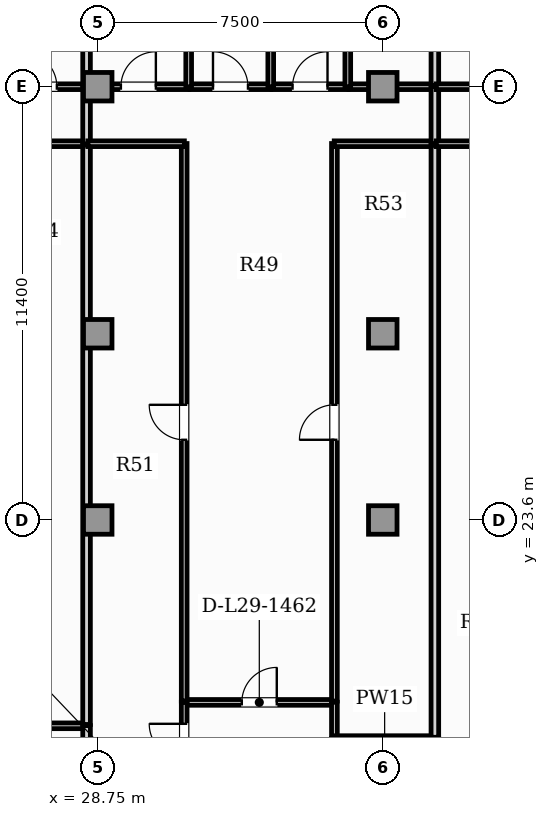
"""IFC4 building model, lengths in metres.
Left out: names, types, materials, properties, quantities, classifications, styles, units other than length and angle.
Written with IfcOpenShell. Run it as: python <this file> out.ifc"""

import sys

from ifc_helpers import new_model, si_unit, direction, frame, frame_2d, origin, origin_2d, place, context, subcontext, project, spatial, rectangle, extrude, element, fill, save


model = new_model("IFC4")
c1 = context("Model", 3, precision=1e-05, world=origin(), true_north=direction((0.0, 1.0)))
c2 = subcontext(c1, "Body", "Model", "MODEL_VIEW")
j1 = project(units=[si_unit("LENGTHUNIT", "METRE"), si_unit("PLANEANGLEUNIT", "RADIAN")], contexts=[c1])
p1 = place(None, origin())
s1 = spatial("IfcSite", under=j1, at=p1, CompositionType="ELEMENT")
p2 = place(p1, origin())
s2 = spatial("IfcBuilding", under=s1, at=p2, CompositionType="ELEMENT")
p3 = place(p2, frame((0.0, 0.0, 119.55)))
s3 = spatial("IfcBuildingStorey", under=s2, at=p3, CompositionType="ELEMENT", Elevation=119.55)
for number, where, z_axis, x_axis in (
    (1, (28.75, 23.6, 0.0), (0.0, 0.0, 1.0), (1.0, 0.0, 0.0)),
    (2, (36.25, 23.6, 0.0), (0.0, 0.0, 1.0), (1.0, 0.0, 0.0)),
    (3, (28.75, 28.5, 0.0), (0.0, 0.0, 1.0), (1.0, 0.0, 0.0)),
    (4, (36.25, 28.5, 0.0), (0.0, 0.0, 1.0), (1.0, 0.0, 0.0)),
    (5, (28.75, 35.0, 0.0), (0.0, 0.0, 1.0), (1.0, 0.0, 0.0)),
    (6, (36.25, 35.0, 0.0), (0.0, 0.0, 1.0), (1.0, 0.0, 0.0)),
):
    element("IfcColumn", number, at=place(p3, frame(where, z_axis=z_axis, x_axis=x_axis)), inside=s3, PredefinedType="COLUMN", context=c2, shape_type="SweptSolid", body=[
        extrude(rectangle(XDim=0.75, YDim=0.75, at=origin_2d()), origin(), (0.0, 0.0, 1.0), 3.85),
    ])
p4 = place(p3, frame((26.004, 33.5, 0.0), z_axis=(0.0, 0.0, 1.0), x_axis=(1.0, 0.0, 0.0)))
e7 = element("IfcWall", 7, at=p4, inside=s3, PredefinedType="PARTITIONING", context=c2, shape_type="SweptSolid", body=[
    extrude(rectangle(XDim=2.457, YDim=0.15, at=frame_2d((1.229, 0.0))), origin(), (0.0, 0.0, 1.0), 3.6),
])
p5 = place(p3, frame((25.967, 35.0, 0.0), z_axis=(0.0, 0.0, 1.0), x_axis=(1.0, 0.0, 0.0)))
e8 = element("IfcWall", 8, at=p5, inside=s3, PredefinedType="PARTITIONING", context=c2, shape_type="SweptSolid", body=[
    extrude(rectangle(XDim=2.494, YDim=0.15, at=frame_2d((1.247, 0.0))), origin(), (0.0, 0.0, 1.0), 2.983),
])
p6 = place(p5, frame((0.787, 0.0, 0.0)))
e9 = element("IfcOpeningElement", 9, at=p6, cuts=e8, PredefinedType="OPENING", context=c2, shape_type="SweptSolid", body=[
    extrude(rectangle(XDim=0.92, YDim=2.1, at=frame_2d((0.46, 1.05))), frame((0.0, 0.085, 0.0), z_axis=(0.0, -1.0, 0.0), x_axis=(1.0, 0.0, 0.0)), (0.0, 0.0, 1.0), 0.17),
])
p7 = place(p3, frame((28.456, 33.495, 0.0), z_axis=(0.0, 0.0, 1.0), x_axis=(0.0, 1.0, 0.0)))
e10 = element("IfcWall", 10, at=p7, inside=s3, PredefinedType="PARTITIONING", context=c2, shape_type="SweptSolid", body=[
    extrude(rectangle(XDim=1.51, YDim=0.2, at=frame_2d((0.755, 0.0))), origin(), (0.0, 0.0, 1.0), 3.6),
])
p8 = place(p3, frame((26.004, 18.185, 0.0), z_axis=(0.0, 0.0, 1.0), x_axis=(1.0, 0.0, 0.0)))
e11 = element("IfcWall", 11, at=p8, inside=s3, PredefinedType="PARTITIONING", context=c2, shape_type="SweptSolid", body=[
    extrude(rectangle(XDim=2.457, YDim=0.15, at=frame_2d((1.229, 0.0))), origin(), (0.0, 0.0, 1.0), 3.6),
])
p9 = place(p3, frame((28.456, 16.748, 0.0), z_axis=(0.0, 0.0, 1.0), x_axis=(0.0, 1.0, 0.0)))
e12 = element("IfcWall", 12, at=p9, inside=s3, PredefinedType="PARTITIONING", context=c2, shape_type="SweptSolid", body=[
    extrude(rectangle(XDim=1.441, YDim=0.2, at=frame_2d((0.721, 0.0))), origin(), (0.0, 0.0, 1.0), 3.6),
])
p10 = place(p3, frame((28.456, 18.219, 0.0), z_axis=(0.0, 0.0, 1.0), x_axis=(0.0, 1.0, 0.0)))
e13 = element("IfcWall", 13, at=p10, inside=s3, PredefinedType="PARTITIONING", context=c2, shape_type="SweptSolid", body=[
    extrude(rectangle(XDim=15.246, YDim=0.2, at=frame_2d((7.623, 0.0))), origin(), (0.0, 0.0, 1.0), 3.6),
])
p11 = place(p3, frame((28.456, 35.035, 0.0), z_axis=(0.0, 0.0, 1.0), x_axis=(0.0, 1.0, 0.0)))
e14 = element("IfcWall", 14, at=p11, inside=s3, PredefinedType="PARTITIONING", context=c2, shape_type="SweptSolid", body=[
    extrude(rectangle(XDim=7.955, YDim=0.2, at=frame_2d((3.978, 0.0))), origin(), (0.0, 0.0, 1.0), 3.6),
])
p12 = place(p3, frame((31.02, 18.801, 0.0), z_axis=(0.0, 0.0, 1.0), x_axis=(1.0, 0.0, 0.0)))
e15 = element("IfcWall", 15, at=p12, inside=s3, PredefinedType="PARTITIONING", context=c2, shape_type="SweptSolid", body=[
    extrude(rectangle(XDim=3.963, YDim=0.15, at=frame_2d((1.981, 0.0))), origin(), (0.0, 0.0, 1.0), 3.6),
])
p13 = place(p12, frame((1.521, 0.0, 0.0)))
e16 = element("IfcOpeningElement", 16, at=p13, cuts=e15, PredefinedType="OPENING", context=c2, shape_type="SweptSolid", body=[
    extrude(rectangle(XDim=0.92, YDim=2.1, at=frame_2d((0.46, 1.05))), frame((0.0, 0.085, 0.0), z_axis=(0.0, -1.0, 0.0), x_axis=(1.0, 0.0, 0.0)), (0.0, 0.0, 1.0), 0.17),
])
p14 = place(p3, frame((31.025, 16.748, 0.0), z_axis=(0.0, 0.0, 1.0), x_axis=(0.0, 1.0, 0.0)))
e17 = element("IfcWall", 17, at=p14, inside=s3, PredefinedType="PARTITIONING", context=c2, shape_type="SweptSolid", body=[
    extrude(rectangle(XDim=2.057, YDim=0.15, at=frame_2d((1.029, 0.0))), origin(), (0.0, 0.0, 1.0), 3.6),
])
p15 = place(p14, frame((0.569, 0.0, 0.0)))
e18 = element("IfcOpeningElement", 18, at=p15, cuts=e17, PredefinedType="OPENING", context=c2, shape_type="SweptSolid", body=[
    extrude(rectangle(XDim=0.92, YDim=2.1, at=frame_2d((0.46, 1.05))), frame((0.0, 0.085, 0.0), z_axis=(0.0, -1.0, 0.0), x_axis=(1.0, 0.0, 0.0)), (0.0, 0.0, 1.0), 0.17),
])
p16 = place(p3, frame((34.978, 17.882, 0.0), z_axis=(0.0, 0.0, 1.0), x_axis=(0.0, 1.0, 0.0)))
e19 = element("IfcWall", 19, at=p16, inside=s3, PredefinedType="PARTITIONING", context=c2, shape_type="SweptSolid", body=[
    extrude(rectangle(XDim=0.923, YDim=0.15, at=frame_2d((0.461, 0.0))), origin(), (0.0, 0.0, 1.0), 3.6),
])
p17 = place(p3, frame((31.025, 18.835, 0.0), z_axis=(0.0, 0.0, 1.0), x_axis=(0.0, 1.0, 0.0)))
e20 = element("IfcWall", 20, at=p17, inside=s3, PredefinedType="PARTITIONING", context=c2, shape_type="SweptSolid", body=[
    extrude(rectangle(XDim=14.669, YDim=0.15, at=frame_2d((7.335, 0.0))), origin(), (0.0, 0.0, 1.0), 3.6),
])
p18 = place(p17, frame((6.875, 0.0, 0.0)))
e21 = element("IfcOpeningElement", 21, at=p18, cuts=e20, PredefinedType="OPENING", context=c2, shape_type="SweptSolid", body=[
    extrude(rectangle(XDim=0.92, YDim=2.1, at=frame_2d((0.46, 1.05))), frame((0.0, 0.085, 0.0), z_axis=(0.0, -1.0, 0.0), x_axis=(1.0, 0.0, 0.0)), (0.0, 0.0, 1.0), 0.17),
])
p19 = place(p3, frame((28.491, 33.5, 0.0), z_axis=(0.0, 0.0, 1.0), x_axis=(1.0, 0.0, 0.0)))
e22 = element("IfcWall", 22, at=p19, inside=s3, PredefinedType="PARTITIONING", context=c2, shape_type="SweptSolid", body=[
    extrude(rectangle(XDim=2.538, YDim=0.15, at=frame_2d((1.269, 0.0))), origin(), (0.0, 0.0, 1.0), 3.6),
])
p20 = place(p3, frame((34.978, 18.835, 0.0), z_axis=(0.0, 0.0, 1.0), x_axis=(0.0, 1.0, 0.0)))
e23 = element("IfcWall", 23, at=p20, inside=s3, PredefinedType="PARTITIONING", context=c2, shape_type="SweptSolid", body=[
    extrude(rectangle(XDim=14.669, YDim=0.15, at=frame_2d((7.335, 0.0))), origin(), (0.0, 0.0, 1.0), 3.6),
])
p21 = place(p20, frame((6.875, 0.0, 0.0)))
e24 = element("IfcOpeningElement", 24, at=p21, cuts=e23, PredefinedType="OPENING", context=c2, shape_type="SweptSolid", body=[
    extrude(rectangle(XDim=0.92, YDim=2.1, at=frame_2d((0.46, 1.05))), frame((0.0, 0.085, 0.0), z_axis=(0.0, -1.0, 0.0), x_axis=(1.0, 0.0, 0.0)), (0.0, 0.0, 1.0), 0.17),
])
p22 = place(p3, frame((34.973, 33.5, 0.0), z_axis=(0.0, 0.0, 1.0), x_axis=(1.0, 0.0, 0.0)))
e25 = element("IfcWall", 25, at=p22, inside=s3, PredefinedType="PARTITIONING", context=c2, shape_type="SweptSolid", body=[
    extrude(rectangle(XDim=2.653, YDim=0.15, at=frame_2d((1.327, 0.0))), origin(), (0.0, 0.0, 1.0), 3.6),
])
p23 = place(p3, frame((28.491, 35.0, 0.0), z_axis=(0.0, 0.0, 1.0), x_axis=(1.0, 0.0, 0.0)))
e26 = element("IfcWall", 26, at=p23, inside=s3, PredefinedType="PARTITIONING", context=c2, shape_type="SweptSolid", body=[
    extrude(rectangle(XDim=2.657, YDim=0.15, at=frame_2d((1.329, 0.0))), origin(), (0.0, 0.0, 1.0), 2.983),
])
p24 = place(p23, frame((0.868, 0.0, 0.0)))
e27 = element("IfcOpeningElement", 27, at=p24, cuts=e26, PredefinedType="OPENING", context=c2, shape_type="SweptSolid", body=[
    extrude(rectangle(XDim=0.92, YDim=2.1, at=frame_2d((0.46, 1.05))), frame((0.0, 0.085, 0.0), z_axis=(0.0, -1.0, 0.0), x_axis=(1.0, 0.0, 0.0)), (0.0, 0.0, 1.0), 0.17),
])
p25 = place(p3, frame((31.178, 35.0, 0.0), z_axis=(0.0, 0.0, 1.0), x_axis=(1.0, 0.0, 0.0)))
e28 = element("IfcWall", 28, at=p25, inside=s3, PredefinedType="PARTITIONING", context=c2, shape_type="SweptSolid", body=[
    extrude(rectangle(XDim=2.129, YDim=0.15, at=frame_2d((1.065, 0.0))), origin(), (0.0, 0.0, 1.0), 2.983),
])
p26 = place(p25, frame((0.604, 0.0, 0.0)))
e29 = element("IfcOpeningElement", 29, at=p26, cuts=e28, PredefinedType="OPENING", context=c2, shape_type="SweptSolid", body=[
    extrude(rectangle(XDim=0.92, YDim=2.1, at=frame_2d((0.46, 1.05))), frame((0.0, 0.085, 0.0), z_axis=(0.0, -1.0, 0.0), x_axis=(1.0, 0.0, 0.0)), (0.0, 0.0, 1.0), 0.17),
])
p27 = place(p3, frame((33.337, 35.0, 0.0), z_axis=(0.0, 0.0, 1.0), x_axis=(1.0, 0.0, 0.0)))
e30 = element("IfcWall", 30, at=p27, inside=s3, PredefinedType="PARTITIONING", context=c2, shape_type="SweptSolid", body=[
    extrude(rectangle(XDim=1.997, YDim=0.15, at=frame_2d((0.999, 0.0))), origin(), (0.0, 0.0, 1.0), 2.983),
])
p28 = place(p27, frame((0.539, 0.0, 0.0)))
e31 = element("IfcOpeningElement", 31, at=p28, cuts=e30, PredefinedType="OPENING", context=c2, shape_type="SweptSolid", body=[
    extrude(rectangle(XDim=0.92, YDim=2.1, at=frame_2d((0.46, 1.05))), frame((0.0, 0.085, 0.0), z_axis=(0.0, -1.0, 0.0), x_axis=(1.0, 0.0, 0.0)), (0.0, 0.0, 1.0), 0.17),
])
p29 = place(p3, frame((35.365, 35.0, 0.0), z_axis=(0.0, 0.0, 1.0), x_axis=(1.0, 0.0, 0.0)))
e32 = element("IfcWall", 32, at=p29, inside=s3, PredefinedType="PARTITIONING", context=c2, shape_type="SweptSolid", body=[
    extrude(rectangle(XDim=2.261, YDim=0.15, at=frame_2d((1.131, 0.0))), origin(), (0.0, 0.0, 1.0), 2.983),
])
p30 = place(p3, frame((37.621, 33.495, 0.0), z_axis=(0.0, 0.0, 1.0), x_axis=(0.0, 1.0, 0.0)))
e33 = element("IfcWall", 33, at=p30, inside=s3, PredefinedType="PARTITIONING", context=c2, shape_type="SweptSolid", body=[
    extrude(rectangle(XDim=1.51, YDim=0.2, at=frame_2d((0.755, 0.0))), origin(), (0.0, 0.0, 1.0), 3.6),
])
p31 = place(p3, frame((34.973, 17.847, 0.0), z_axis=(0.0, 0.0, 1.0), x_axis=(1.0, 0.0, 0.0)))
e34 = element("IfcWall", 34, at=p31, inside=s3, PredefinedType="PARTITIONING", context=c2, shape_type="SweptSolid", body=[
    extrude(rectangle(XDim=2.653, YDim=0.15, at=frame_2d((1.327, 0.0))), origin(), (0.0, 0.0, 1.0), 3.6),
])
p32 = place(p3, frame((37.621, 17.882, 0.0), z_axis=(0.0, 0.0, 1.0), x_axis=(0.0, 1.0, 0.0)))
e35 = element("IfcWall", 35, at=p32, inside=s3, PredefinedType="PARTITIONING", context=c2, shape_type="SweptSolid", body=[
    extrude(rectangle(XDim=15.583, YDim=0.2, at=frame_2d((7.792, 0.0))), origin(), (0.0, 0.0, 1.0), 3.6),
])
for number, where, z_axis, x_axis in (
    (36, (31.143, 34.995, 0.0), (0.0, 0.0, 1.0), (0.0, 1.0, 0.0)),
    (37, (33.302, 34.995, 0.0), (0.0, 0.0, 1.0), (0.0, 1.0, 0.0)),
):
    element("IfcWall", number, at=place(p3, frame(where, z_axis=z_axis, x_axis=x_axis)), inside=s3, PredefinedType="PARTITIONING", context=c2, shape_type="SweptSolid", body=[
        extrude(rectangle(XDim=7.995, YDim=0.15, at=frame_2d((3.998, 0.0))), origin(), (0.0, 0.0, 1.0), 3.6),
    ])
p33 = place(p3, frame((35.33, 34.995, 0.0), z_axis=(0.0, 0.0, 1.0), x_axis=(0.0, 1.0, 0.0)))
e38 = element("IfcWall", 38, at=p33, inside=s3, PredefinedType="PARTITIONING", context=c2, shape_type="SweptSolid", body=[
    extrude(rectangle(XDim=7.995, YDim=0.15, at=frame_2d((3.998, 0.0))), origin(), (0.0, 0.0, 1.0), 3.6),
])
p34 = place(p33, frame((3.23, 0.0, 0.0)))
e39 = element("IfcOpeningElement", 39, at=p34, cuts=e38, PredefinedType="OPENING", context=c2, shape_type="SweptSolid", body=[
    extrude(rectangle(XDim=0.92, YDim=2.1, at=frame_2d((0.46, 1.05))), frame((0.0, 0.085, 0.0), z_axis=(0.0, -1.0, 0.0), x_axis=(1.0, 0.0, 0.0)), (0.0, 0.0, 1.0), 0.17),
])
p35 = place(p3, frame((37.621, 35.035, 0.0), z_axis=(0.0, 0.0, 1.0), x_axis=(0.0, 1.0, 0.0)))
e40 = element("IfcWall", 40, at=p35, inside=s3, PredefinedType="PARTITIONING", context=c2, shape_type="SweptSolid", body=[
    extrude(rectangle(XDim=7.955, YDim=0.2, at=frame_2d((3.978, 0.0))), origin(), (0.0, 0.0, 1.0), 3.6),
])
p36 = place(p3, frame((37.656, 33.5, 0.0), z_axis=(0.0, 0.0, 1.0), x_axis=(1.0, 0.0, 0.0)))
e41 = element("IfcWall", 41, at=p36, inside=s3, PredefinedType="PARTITIONING", context=c2, shape_type="SweptSolid", body=[
    extrude(rectangle(XDim=2.275, YDim=0.15, at=frame_2d((1.137, 0.0))), origin(), (0.0, 0.0, 1.0), 3.6),
])
p37 = place(p3, frame((37.656, 35.0, 0.0), z_axis=(0.0, 0.0, 1.0), x_axis=(1.0, 0.0, 0.0)))
e42 = element("IfcWall", 42, at=p37, inside=s3, PredefinedType="PARTITIONING", context=c2, shape_type="SweptSolid", body=[
    extrude(rectangle(XDim=3.099, YDim=0.15, at=frame_2d((1.549, 0.0))), origin(), (0.0, 0.0, 1.0), 2.983),
])
p38 = place(p37, frame((1.089, 0.0, 0.0)))
e43 = element("IfcOpeningElement", 43, at=p38, cuts=e42, PredefinedType="OPENING", context=c2, shape_type="SweptSolid", body=[
    extrude(rectangle(XDim=0.92, YDim=2.1, at=frame_2d((0.46, 1.05))), frame((0.0, 0.085, 0.0), z_axis=(0.0, -1.0, 0.0), x_axis=(1.0, 0.0, 0.0)), (0.0, 0.0, 1.0), 0.17),
])
p39 = place(p6, origin())
e44 = element("IfcDoor", 44, at=p39, inside=s3, OperationType="SINGLE_SWING_LEFT", PredefinedType="DOOR", context=c2, shape_type="SweptSolid", body=[
    extrude(rectangle(XDim=0.92, YDim=2.1, at=frame_2d((0.46, 1.05))), frame((0.0, 0.025, 0.0), z_axis=(0.0, -1.0, 0.0), x_axis=(1.0, 0.0, 0.0)), (0.0, 0.0, 1.0), 0.05),
])
fill(e9, e44)
p40 = place(p13, origin())
e45 = element("IfcDoor", 45, at=p40, inside=s3, OperationType="SINGLE_SWING_RIGHT", PredefinedType="DOOR", context=c2, shape_type="SweptSolid", body=[
    extrude(rectangle(XDim=0.92, YDim=2.1, at=frame_2d((0.46, 1.05))), frame((0.0, 0.025, 0.0), z_axis=(0.0, -1.0, 0.0), x_axis=(1.0, 0.0, 0.0)), (0.0, 0.0, 1.0), 0.05),
])
fill(e16, e45)
p41 = place(p15, origin())
e46 = element("IfcDoor", 46, at=p41, inside=s3, OperationType="SINGLE_SWING_RIGHT", PredefinedType="DOOR", context=c2, shape_type="SweptSolid", body=[
    extrude(rectangle(XDim=0.92, YDim=2.1, at=frame_2d((0.46, 1.05))), frame((0.0, 0.025, 0.0), z_axis=(0.0, -1.0, 0.0), x_axis=(1.0, 0.0, 0.0)), (0.0, 0.0, 1.0), 0.05),
])
fill(e18, e46)
p42 = place(p18, origin())
e47 = element("IfcDoor", 47, at=p42, inside=s3, OperationType="SINGLE_SWING_RIGHT", PredefinedType="DOOR", context=c2, shape_type="SweptSolid", body=[
    extrude(rectangle(XDim=0.92, YDim=2.1, at=frame_2d((0.46, 1.05))), frame((0.0, 0.025, 0.0), z_axis=(0.0, -1.0, 0.0), x_axis=(1.0, 0.0, 0.0)), (0.0, 0.0, 1.0), 0.05),
])
fill(e21, e47)
p43 = place(p21, origin())
e48 = element("IfcDoor", 48, at=p43, inside=s3, OperationType="SINGLE_SWING_LEFT", PredefinedType="DOOR", context=c2, shape_type="SweptSolid", body=[
    extrude(rectangle(XDim=0.92, YDim=2.1, at=frame_2d((0.46, 1.05))), frame((0.0, 0.025, 0.0), z_axis=(0.0, -1.0, 0.0), x_axis=(1.0, 0.0, 0.0)), (0.0, 0.0, 1.0), 0.05),
])
fill(e24, e48)
p44 = place(p24, origin())
e49 = element("IfcDoor", 49, at=p44, inside=s3, OperationType="SINGLE_SWING_RIGHT", PredefinedType="DOOR", context=c2, shape_type="SweptSolid", body=[
    extrude(rectangle(XDim=0.92, YDim=2.1, at=frame_2d((0.46, 1.05))), frame((0.0, 0.025, 0.0), z_axis=(0.0, -1.0, 0.0), x_axis=(1.0, 0.0, 0.0)), (0.0, 0.0, 1.0), 0.05),
])
fill(e27, e49)
p45 = place(p26, origin())
e50 = element("IfcDoor", 50, at=p45, inside=s3, OperationType="SINGLE_SWING_LEFT", PredefinedType="DOOR", context=c2, shape_type="SweptSolid", body=[
    extrude(rectangle(XDim=0.92, YDim=2.1, at=frame_2d((0.46, 1.05))), frame((0.0, 0.025, 0.0), z_axis=(0.0, -1.0, 0.0), x_axis=(1.0, 0.0, 0.0)), (0.0, 0.0, 1.0), 0.05),
])
fill(e29, e50)
p46 = place(p28, origin())
e51 = element("IfcDoor", 51, at=p46, inside=s3, OperationType="SINGLE_SWING_RIGHT", PredefinedType="DOOR", context=c2, shape_type="SweptSolid", body=[
    extrude(rectangle(XDim=0.92, YDim=2.1, at=frame_2d((0.46, 1.05))), frame((0.0, 0.025, 0.0), z_axis=(0.0, -1.0, 0.0), x_axis=(1.0, 0.0, 0.0)), (0.0, 0.0, 1.0), 0.05),
])
fill(e31, e51)
save(model, sys.argv[1])
